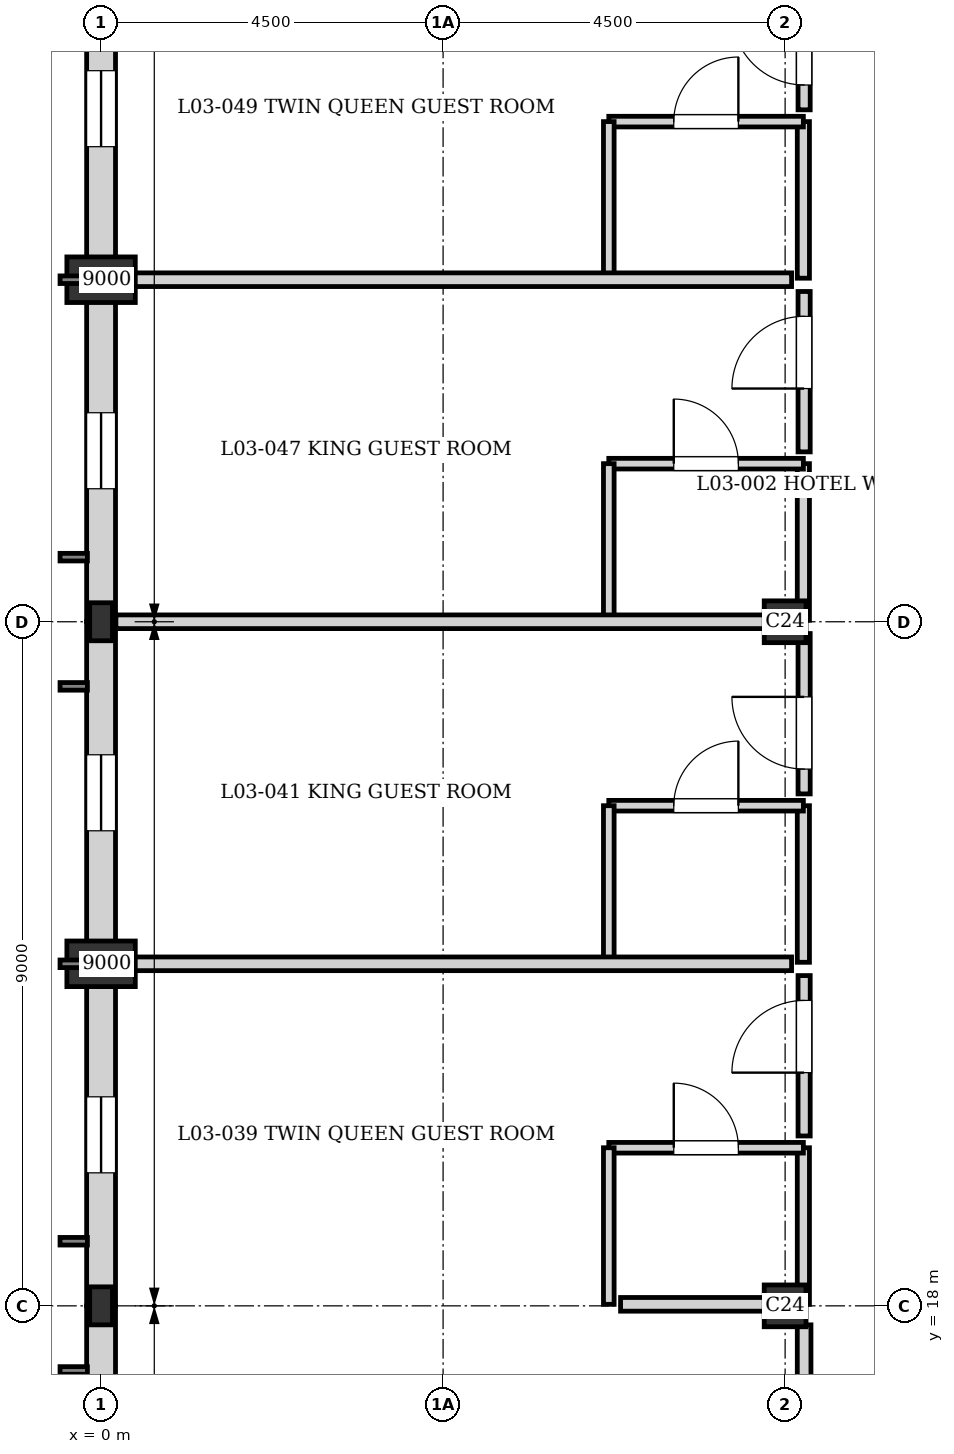
"""IFC4 building model, lengths in metres.
Left out: names, types, materials, properties, quantities, classifications, styles, units other than length and angle.
Written with IfcOpenShell. Run it as: python <this file> out.ifc"""

import sys

from ifc_helpers import new_model, si_unit, direction, frame, frame_2d, origin, origin_2d, place, context, subcontext, project, spatial, rectangle, i_section, extrude, element, fill, save


model = new_model("IFC4")
c1 = context("Model", 3, precision=1e-05, world=origin(), true_north=direction((0.0, 1.0)))
c2 = subcontext(c1, "Body", "Model", "MODEL_VIEW")
j1 = project(units=[si_unit("LENGTHUNIT", "METRE"), si_unit("PLANEANGLEUNIT", "RADIAN")], contexts=[c1])
p1 = place(None, origin())
s1 = spatial("IfcSite", under=j1, at=p1, CompositionType="ELEMENT")
p2 = place(p1, origin())
s2 = spatial("IfcBuilding", under=s1, at=p2, CompositionType="ELEMENT")
p3 = place(p2, frame((0.0, 0.0, 11.52)))
s3 = spatial("IfcBuildingStorey", under=s2, at=p3, CompositionType="ELEMENT", Elevation=11.52)
for number, where, z_axis, x_axis in (
    (1, (0.0, 18.0, 0.0), (0.0, 0.0, 1.0), (1.0, 0.0, 0.0)),
    (2, (0.0, 27.0, 0.0), (0.0, 0.0, 1.0), (1.0, 0.0, 0.0)),
):
    element("IfcColumn", number, at=place(p3, frame(where, z_axis=z_axis, x_axis=x_axis)), inside=s3, PredefinedType="COLUMN", context=c2, shape_type="SweptSolid", body=[
        extrude(i_section(OverallWidth=0.3, OverallDepth=0.5, WebThickness=0.014, FlangeThickness=0.028, at=origin_2d()), origin(), (0.0, 0.0, 1.0), 3.04),
    ])
for number, where, z_axis, x_axis in (
    (3, (9.0, 18.0, 0.0), (0.0, 0.0, 1.0), (1.0, 0.0, 0.0)),
    (4, (9.0, 27.0, 0.0), (0.0, 0.0, 1.0), (1.0, 0.0, 0.0)),
):
    element("IfcColumn", number, at=place(p3, frame(where, z_axis=z_axis, x_axis=x_axis)), inside=s3, PredefinedType="COLUMN", context=c2, shape_type="SweptSolid", body=[
        extrude(rectangle(XDim=0.55, YDim=0.55, at=origin_2d()), origin(), (0.0, 0.0, 1.0), 3.04),
    ])
for number, where, z_axis, x_axis in (
    (5, (0.0, 22.5, 0.0), (0.0, 0.0, 1.0), (0.0, 1.0, 0.0)),
    (6, (0.0, 31.5, 0.0), (0.0, 0.0, 1.0), (0.0, 1.0, 0.0)),
):
    element("IfcColumn", number, at=place(p3, frame(where, z_axis=z_axis, x_axis=x_axis)), inside=s3, PredefinedType="PILASTER", context=c2, shape_type="SweptSolid", body=[
        extrude(rectangle(XDim=0.6, YDim=0.9, at=origin_2d()), origin(), (0.0, 0.0, 1.0), 3.04),
    ])
p4 = place(p3, frame((0.0, 9.0, 0.0), z_axis=(0.0, 0.0, 1.0), x_axis=(0.0, 1.0, 0.0)))
e7 = element("IfcWall", 7, at=p4, inside=s3, PredefinedType="SOLIDWALL", context=c2, shape_type="SweptSolid", body=[
    extrude(rectangle(XDim=9.0, YDim=0.38, at=frame_2d((4.5, 0.0))), origin(), (0.0, 0.0, 1.0), 2.38),
])
p5 = place(p4, frame((1.75, 0.0, 0.35)))
e8 = element("IfcOpeningElement", 8, at=p5, cuts=e7, PredefinedType="OPENING", context=c2, shape_type="SweptSolid", body=[
    extrude(rectangle(XDim=1.0, YDim=1.6, at=frame_2d((0.5, 0.8))), frame((0.0, 0.2, 0.0), z_axis=(0.0, -1.0, 0.0), x_axis=(1.0, 0.0, 0.0)), (0.0, 0.0, 1.0), 0.4),
])
p6 = place(p4, frame((6.25, 0.0, 0.35)))
e9 = element("IfcOpeningElement", 9, at=p6, cuts=e7, PredefinedType="OPENING", context=c2, shape_type="SweptSolid", body=[
    extrude(rectangle(XDim=1.0, YDim=1.6, at=frame_2d((0.5, 0.8))), frame((0.0, 0.2, 0.0), z_axis=(0.0, -1.0, 0.0), x_axis=(1.0, 0.0, 0.0)), (0.0, 0.0, 1.0), 0.4),
])
p7 = place(p3, frame((0.0, 18.0, 0.0), z_axis=(0.0, 0.0, 1.0), x_axis=(0.0, 1.0, 0.0)))
e10 = element("IfcWall", 10, at=p7, inside=s3, PredefinedType="SOLIDWALL", context=c2, shape_type="SweptSolid", body=[
    extrude(rectangle(XDim=9.0, YDim=0.38, at=frame_2d((4.5, 0.0))), origin(), (0.0, 0.0, 1.0), 2.82),
])
p8 = place(p7, frame((1.75, 0.0, 0.35)))
e11 = element("IfcOpeningElement", 11, at=p8, cuts=e10, PredefinedType="OPENING", context=c2, shape_type="SweptSolid", body=[
    extrude(rectangle(XDim=1.0, YDim=1.6, at=frame_2d((0.5, 0.8))), frame((0.0, 0.2, 0.0), z_axis=(0.0, -1.0, 0.0), x_axis=(1.0, 0.0, 0.0)), (0.0, 0.0, 1.0), 0.4),
])
p9 = place(p7, frame((6.25, 0.0, 0.35)))
e12 = element("IfcOpeningElement", 12, at=p9, cuts=e10, PredefinedType="OPENING", context=c2, shape_type="SweptSolid", body=[
    extrude(rectangle(XDim=1.0, YDim=1.6, at=frame_2d((0.5, 0.8))), frame((0.0, 0.2, 0.0), z_axis=(0.0, -1.0, 0.0), x_axis=(1.0, 0.0, 0.0)), (0.0, 0.0, 1.0), 0.4),
])
p10 = place(p3, frame((0.0, 27.0, 0.0), z_axis=(0.0, 0.0, 1.0), x_axis=(0.0, 1.0, 0.0)))
e13 = element("IfcWall", 13, at=p10, inside=s3, PredefinedType="SOLIDWALL", context=c2, shape_type="SweptSolid", body=[
    extrude(rectangle(XDim=8.87, YDim=0.38, at=frame_2d((4.435, 0.0))), origin(), (0.0, 0.0, 1.0), 2.48),
])
p11 = place(p10, frame((1.75, 0.0, 0.35)))
e14 = element("IfcOpeningElement", 14, at=p11, cuts=e13, PredefinedType="OPENING", context=c2, shape_type="SweptSolid", body=[
    extrude(rectangle(XDim=1.0, YDim=1.6, at=frame_2d((0.5, 0.8))), frame((0.0, 0.2, 0.0), z_axis=(0.0, -1.0, 0.0), x_axis=(1.0, 0.0, 0.0)), (0.0, 0.0, 1.0), 0.4),
])
p12 = place(p10, frame((6.25, 0.0, 0.35)))
e15 = element("IfcOpeningElement", 15, at=p12, cuts=e13, PredefinedType="OPENING", context=c2, shape_type="SweptSolid", body=[
    extrude(rectangle(XDim=1.0, YDim=1.6, at=frame_2d((0.5, 0.8))), frame((0.0, 0.2, 0.0), z_axis=(0.0, -1.0, 0.0), x_axis=(1.0, 0.0, 0.0)), (0.0, 0.0, 1.0), 0.4),
])
p13 = place(p3, frame((9.24, 18.02, 0.0), z_axis=(0.0, 0.0, 1.0), x_axis=(0.0, 1.0, 0.0)))
e16 = element("IfcWall", 16, at=p13, inside=s3, PredefinedType="PARTITIONING", context=c2, shape_type="SweptSolid", body=[
    extrude(rectangle(XDim=2.06, YDim=0.16, at=frame_2d((1.03, 0.0))), origin(), (0.0, 0.0, 1.0), 2.82),
])
p14 = place(p3, frame((6.68, 20.08, 0.0), z_axis=(0.0, 0.0, 1.0), x_axis=(1.0, 0.0, 0.0)))
e17 = element("IfcWall", 17, at=p14, inside=s3, PredefinedType="PLUMBINGWALL", context=c2, shape_type="SweptSolid", body=[
    extrude(rectangle(XDim=2.56, YDim=0.14, at=frame_2d((1.28, 0.0))), origin(), (0.0, 0.0, 1.0), 2.82),
])
p15 = place(p14, frame((0.855, 0.0, 0.0)))
e18 = element("IfcOpeningElement", 18, at=p15, cuts=e17, PredefinedType="OPENING", context=c2, shape_type="SweptSolid", body=[
    extrude(rectangle(XDim=0.85, YDim=2.04, at=frame_2d((0.425, 1.02))), frame((0.0, 0.08, 0.0), z_axis=(0.0, -1.0, 0.0), x_axis=(1.0, 0.0, 0.0)), (0.0, 0.0, 1.0), 0.16),
])
p16 = place(p3, frame((6.68, 18.02, 0.0), z_axis=(0.0, 0.0, 1.0), x_axis=(0.0, 1.0, 0.0)))
e19 = element("IfcWall", 19, at=p16, inside=s3, PredefinedType="PLUMBINGWALL", context=c2, shape_type="SweptSolid", body=[
    extrude(rectangle(XDim=2.06, YDim=0.14, at=frame_2d((1.03, 0.0))), origin(), (0.0, 0.0, 1.0), 2.82),
])
p17 = place(p3, frame((9.24, 22.52, 0.0), z_axis=(0.0, 0.0, 1.0), x_axis=(0.0, 1.0, 0.0)))
e20 = element("IfcWall", 20, at=p17, inside=s3, PredefinedType="PARTITIONING", context=c2, shape_type="SweptSolid", body=[
    extrude(rectangle(XDim=2.06, YDim=0.16, at=frame_2d((1.03, 0.0))), origin(), (0.0, 0.0, 1.0), 2.82),
])
p18 = place(p3, frame((6.68, 24.58, 0.0), z_axis=(0.0, 0.0, 1.0), x_axis=(1.0, 0.0, 0.0)))
e21 = element("IfcWall", 21, at=p18, inside=s3, PredefinedType="PLUMBINGWALL", context=c2, shape_type="SweptSolid", body=[
    extrude(rectangle(XDim=2.56, YDim=0.14, at=frame_2d((1.28, 0.0))), origin(), (0.0, 0.0, 1.0), 2.82),
])
p19 = place(p18, frame((0.855, 0.0, 0.0)))
e22 = element("IfcOpeningElement", 22, at=p19, cuts=e21, PredefinedType="OPENING", context=c2, shape_type="SweptSolid", body=[
    extrude(rectangle(XDim=0.85, YDim=2.04, at=frame_2d((0.425, 1.02))), frame((0.0, 0.08, 0.0), z_axis=(0.0, -1.0, 0.0), x_axis=(1.0, 0.0, 0.0)), (0.0, 0.0, 1.0), 0.16),
])
p20 = place(p3, frame((6.68, 22.52, 0.0), z_axis=(0.0, 0.0, 1.0), x_axis=(0.0, 1.0, 0.0)))
e23 = element("IfcWall", 23, at=p20, inside=s3, PredefinedType="PLUMBINGWALL", context=c2, shape_type="SweptSolid", body=[
    extrude(rectangle(XDim=2.06, YDim=0.14, at=frame_2d((1.03, 0.0))), origin(), (0.0, 0.0, 1.0), 2.82),
])
p21 = place(p3, frame((9.24, 27.02, 0.0), z_axis=(0.0, 0.0, 1.0), x_axis=(0.0, 1.0, 0.0)))
e24 = element("IfcWall", 24, at=p21, inside=s3, PredefinedType="PARTITIONING", context=c2, shape_type="SweptSolid", body=[
    extrude(rectangle(XDim=2.06, YDim=0.16, at=frame_2d((1.03, 0.0))), origin(), (0.0, 0.0, 1.0), 2.82),
])
p22 = place(p3, frame((6.68, 29.08, 0.0), z_axis=(0.0, 0.0, 1.0), x_axis=(1.0, 0.0, 0.0)))
e25 = element("IfcWall", 25, at=p22, inside=s3, PredefinedType="PLUMBINGWALL", context=c2, shape_type="SweptSolid", body=[
    extrude(rectangle(XDim=2.56, YDim=0.14, at=frame_2d((1.28, 0.0))), origin(), (0.0, 0.0, 1.0), 2.82),
])
p23 = place(p22, frame((0.855, 0.0, 0.0)))
e26 = element("IfcOpeningElement", 26, at=p23, cuts=e25, PredefinedType="OPENING", context=c2, shape_type="SweptSolid", body=[
    extrude(rectangle(XDim=0.85, YDim=2.04, at=frame_2d((0.425, 1.02))), frame((0.0, 0.08, 0.0), z_axis=(0.0, -1.0, 0.0), x_axis=(1.0, 0.0, 0.0)), (0.0, 0.0, 1.0), 0.16),
])
p24 = place(p3, frame((6.68, 27.02, 0.0), z_axis=(0.0, 0.0, 1.0), x_axis=(0.0, 1.0, 0.0)))
e27 = element("IfcWall", 27, at=p24, inside=s3, PredefinedType="PLUMBINGWALL", context=c2, shape_type="SweptSolid", body=[
    extrude(rectangle(XDim=2.06, YDim=0.14, at=frame_2d((1.03, 0.0))), origin(), (0.0, 0.0, 1.0), 2.82),
])
p25 = place(p3, frame((9.24, 31.52, 0.0), z_axis=(0.0, 0.0, 1.0), x_axis=(0.0, 1.0, 0.0)))
e28 = element("IfcWall", 28, at=p25, inside=s3, PredefinedType="PARTITIONING", context=c2, shape_type="SweptSolid", body=[
    extrude(rectangle(XDim=2.06, YDim=0.16, at=frame_2d((1.03, 0.0))), origin(), (0.0, 0.0, 1.0), 2.82),
])
p26 = place(p3, frame((6.68, 33.58, 0.0), z_axis=(0.0, 0.0, 1.0), x_axis=(1.0, 0.0, 0.0)))
e29 = element("IfcWall", 29, at=p26, inside=s3, PredefinedType="PLUMBINGWALL", context=c2, shape_type="SweptSolid", body=[
    extrude(rectangle(XDim=2.56, YDim=0.14, at=frame_2d((1.28, 0.0))), origin(), (0.0, 0.0, 1.0), 2.82),
])
p27 = place(p26, frame((0.855, 0.0, 0.0)))
e30 = element("IfcOpeningElement", 30, at=p27, cuts=e29, PredefinedType="OPENING", context=c2, shape_type="SweptSolid", body=[
    extrude(rectangle(XDim=0.85, YDim=2.04, at=frame_2d((0.425, 1.02))), frame((0.0, 0.08, 0.0), z_axis=(0.0, -1.0, 0.0), x_axis=(1.0, 0.0, 0.0)), (0.0, 0.0, 1.0), 0.16),
])
p28 = place(p3, frame((6.68, 31.52, 0.0), z_axis=(0.0, 0.0, 1.0), x_axis=(0.0, 1.0, 0.0)))
e31 = element("IfcWall", 31, at=p28, inside=s3, PredefinedType="PLUMBINGWALL", context=c2, shape_type="SweptSolid", body=[
    extrude(rectangle(XDim=2.06, YDim=0.14, at=frame_2d((1.03, 0.0))), origin(), (0.0, 0.0, 1.0), 2.82),
])
p29 = place(p3, frame((9.25, 11.45, 0.0), z_axis=(0.0, 0.0, 1.0), x_axis=(0.0, 1.0, 0.0)))
e32 = element("IfcWall", 32, at=p29, inside=s3, PredefinedType="PARTITIONING", context=c2, shape_type="SweptSolid", body=[
    extrude(rectangle(XDim=6.3, YDim=0.18, at=frame_2d((3.15, 0.0))), origin(), (0.0, 0.0, 1.0), 2.82),
])
p30 = place(p3, frame((0.195, 22.5, 0.0), z_axis=(0.0, 0.0, 1.0), x_axis=(1.0, 0.0, 0.0)))
e33 = element("IfcWall", 33, at=p30, inside=s3, PredefinedType="PARTITIONING", context=c2, shape_type="SweptSolid", body=[
    extrude(rectangle(XDim=8.89, YDim=0.18, at=frame_2d((4.445, 0.0))), origin(), (0.0, 0.0, 1.0), 2.82),
])
p31 = place(p3, frame((0.195, 27.0, 0.0), z_axis=(0.0, 0.0, 1.0), x_axis=(1.0, 0.0, 0.0)))
e34 = element("IfcWall", 34, at=p31, inside=s3, PredefinedType="PARTITIONING", context=c2, shape_type="SweptSolid", body=[
    extrude(rectangle(XDim=8.89, YDim=0.18, at=frame_2d((4.445, 0.0))), origin(), (0.0, 0.0, 1.0), 2.45),
])
p32 = place(p3, frame((0.195, 31.5, 0.0), z_axis=(0.0, 0.0, 1.0), x_axis=(1.0, 0.0, 0.0)))
e35 = element("IfcWall", 35, at=p32, inside=s3, PredefinedType="PARTITIONING", context=c2, shape_type="SweptSolid", body=[
    extrude(rectangle(XDim=8.89, YDim=0.18, at=frame_2d((4.445, 0.0))), origin(), (0.0, 0.0, 1.0), 2.82),
])
p33 = place(p3, frame((6.835, 18.02, 0.0), z_axis=(0.0, 0.0, 1.0), x_axis=(1.0, 0.0, 0.0)))
e36 = element("IfcWall", 36, at=p33, inside=s3, PredefinedType="PARTITIONING", context=c2, shape_type="SweptSolid", body=[
    extrude(rectangle(XDim=2.26, YDim=0.18, at=frame_2d((1.13, 0.0))), origin(), (0.0, 0.0, 1.0), 2.48),
])
p34 = place(p3, frame((9.25, 20.235, 0.0), z_axis=(0.0, 0.0, 1.0), x_axis=(0.0, 1.0, 0.0)))
e37 = element("IfcWall", 37, at=p34, inside=s3, PredefinedType="PARTITIONING", context=c2, shape_type="SweptSolid", body=[
    extrude(rectangle(XDim=2.11, YDim=0.16, at=frame_2d((1.055, 0.0))), origin(), (0.0, 0.0, 1.0), 2.82),
])
p35 = place(p34, frame((0.833, 0.0, 0.0)))
e38 = element("IfcOpeningElement", 38, at=p35, cuts=e37, PredefinedType="OPENING", context=c2, shape_type="SweptSolid", body=[
    extrude(rectangle(XDim=0.95, YDim=2.15, at=frame_2d((0.475, 1.075))), frame((0.0, 0.09, 0.0), z_axis=(0.0, -1.0, 0.0), x_axis=(1.0, 0.0, 0.0)), (0.0, 0.0, 1.0), 0.18),
])
p36 = place(p3, frame((9.25, 24.735, 0.0), z_axis=(0.0, 0.0, 1.0), x_axis=(0.0, 1.0, 0.0)))
e39 = element("IfcWall", 39, at=p36, inside=s3, PredefinedType="PARTITIONING", context=c2, shape_type="SweptSolid", body=[
    extrude(rectangle(XDim=2.11, YDim=0.16, at=frame_2d((1.055, 0.0))), origin(), (0.0, 0.0, 1.0), 2.82),
])
p37 = place(p36, frame((0.327, 0.0, 0.0)))
e40 = element("IfcOpeningElement", 40, at=p37, cuts=e39, PredefinedType="OPENING", context=c2, shape_type="SweptSolid", body=[
    extrude(rectangle(XDim=0.95, YDim=2.15, at=frame_2d((0.475, 1.075))), frame((0.0, 0.09, 0.0), z_axis=(0.0, -1.0, 0.0), x_axis=(1.0, 0.0, 0.0)), (0.0, 0.0, 1.0), 0.18),
])
p38 = place(p3, frame((9.25, 29.235, 0.0), z_axis=(0.0, 0.0, 1.0), x_axis=(0.0, 1.0, 0.0)))
e41 = element("IfcWall", 41, at=p38, inside=s3, PredefinedType="PARTITIONING", context=c2, shape_type="SweptSolid", body=[
    extrude(rectangle(XDim=2.11, YDim=0.16, at=frame_2d((1.055, 0.0))), origin(), (0.0, 0.0, 1.0), 2.82),
])
p39 = place(p38, frame((0.833, 0.0, 0.0)))
e42 = element("IfcOpeningElement", 42, at=p39, cuts=e41, PredefinedType="OPENING", context=c2, shape_type="SweptSolid", body=[
    extrude(rectangle(XDim=0.95, YDim=2.15, at=frame_2d((0.475, 1.075))), frame((0.0, 0.09, 0.0), z_axis=(0.0, -1.0, 0.0), x_axis=(1.0, 0.0, 0.0)), (0.0, 0.0, 1.0), 0.18),
])
p40 = place(p3, frame((9.25, 33.735, 0.0), z_axis=(0.0, 0.0, 1.0), x_axis=(0.0, 1.0, 0.0)))
e43 = element("IfcWall", 43, at=p40, inside=s3, PredefinedType="PARTITIONING", context=c2, shape_type="SweptSolid", body=[
    extrude(rectangle(XDim=2.11, YDim=0.16, at=frame_2d((1.055, 0.0))), origin(), (0.0, 0.0, 1.0), 2.82),
])
p41 = place(p40, frame((0.327, 0.0, 0.0)))
e44 = element("IfcOpeningElement", 44, at=p41, cuts=e43, PredefinedType="OPENING", context=c2, shape_type="SweptSolid", body=[
    extrude(rectangle(XDim=0.95, YDim=2.15, at=frame_2d((0.475, 1.075))), frame((0.0, 0.09, 0.0), z_axis=(0.0, -1.0, 0.0), x_axis=(1.0, 0.0, 0.0)), (0.0, 0.0, 1.0), 0.18),
])
p42 = place(p8, origin())
e45 = element("IfcWindow", 45, at=p42, inside=s3, PartitioningType="SINGLE_PANEL", PredefinedType="WINDOW", context=c2, shape_type="SweptSolid", body=[
    extrude(rectangle(XDim=1.0, YDim=1.6, at=frame_2d((0.5, 0.8))), frame((0.0, 0.03, 0.0), z_axis=(0.0, -1.0, 0.0), x_axis=(1.0, 0.0, 0.0)), (0.0, 0.0, 1.0), 0.06),
])
fill(e11, e45)
p43 = place(p9, origin())
e46 = element("IfcWindow", 46, at=p43, inside=s3, PartitioningType="SINGLE_PANEL", PredefinedType="WINDOW", context=c2, shape_type="SweptSolid", body=[
    extrude(rectangle(XDim=1.0, YDim=1.6, at=frame_2d((0.5, 0.8))), frame((0.0, 0.03, 0.0), z_axis=(0.0, -1.0, 0.0), x_axis=(1.0, 0.0, 0.0)), (0.0, 0.0, 1.0), 0.06),
])
fill(e12, e46)
p44 = place(p11, origin())
e47 = element("IfcWindow", 47, at=p44, inside=s3, PartitioningType="SINGLE_PANEL", PredefinedType="WINDOW", context=c2, shape_type="SweptSolid", body=[
    extrude(rectangle(XDim=1.0, YDim=1.6, at=frame_2d((0.5, 0.8))), frame((0.0, 0.03, 0.0), z_axis=(0.0, -1.0, 0.0), x_axis=(1.0, 0.0, 0.0)), (0.0, 0.0, 1.0), 0.06),
])
fill(e14, e47)
p45 = place(p12, origin())
e48 = element("IfcWindow", 48, at=p45, inside=s3, PartitioningType="SINGLE_PANEL", PredefinedType="WINDOW", context=c2, shape_type="SweptSolid", body=[
    extrude(rectangle(XDim=1.0, YDim=1.6, at=frame_2d((0.5, 0.8))), frame((0.0, 0.03, 0.0), z_axis=(0.0, -1.0, 0.0), x_axis=(1.0, 0.0, 0.0)), (0.0, 0.0, 1.0), 0.06),
])
fill(e15, e48)
p46 = place(p15, origin())
e49 = element("IfcDoor", 49, at=p46, inside=s3, OperationType="SINGLE_SWING_LEFT", PredefinedType="DOOR", context=c2, shape_type="SweptSolid", body=[
    extrude(rectangle(XDim=0.85, YDim=2.04, at=frame_2d((0.425, 1.02))), frame((0.0, 0.025, 0.0), z_axis=(0.0, -1.0, 0.0), x_axis=(1.0, 0.0, 0.0)), (0.0, 0.0, 1.0), 0.05),
])
fill(e18, e49)
p47 = place(p19, origin())
e50 = element("IfcDoor", 50, at=p47, inside=s3, OperationType="SINGLE_SWING_RIGHT", PredefinedType="DOOR", context=c2, shape_type="SweptSolid", body=[
    extrude(rectangle(XDim=0.85, YDim=2.04, at=frame_2d((0.425, 1.02))), frame((0.0, 0.025, 0.0), z_axis=(0.0, -1.0, 0.0), x_axis=(1.0, 0.0, 0.0)), (0.0, 0.0, 1.0), 0.05),
])
fill(e22, e50)
p48 = place(p23, origin())
e51 = element("IfcDoor", 51, at=p48, inside=s3, OperationType="SINGLE_SWING_LEFT", PredefinedType="DOOR", context=c2, shape_type="SweptSolid", body=[
    extrude(rectangle(XDim=0.85, YDim=2.04, at=frame_2d((0.425, 1.02))), frame((0.0, 0.025, 0.0), z_axis=(0.0, -1.0, 0.0), x_axis=(1.0, 0.0, 0.0)), (0.0, 0.0, 1.0), 0.05),
])
fill(e26, e51)
p49 = place(p27, origin())
e52 = element("IfcDoor", 52, at=p49, inside=s3, OperationType="SINGLE_SWING_RIGHT", PredefinedType="DOOR", context=c2, shape_type="SweptSolid", body=[
    extrude(rectangle(XDim=0.85, YDim=2.04, at=frame_2d((0.425, 1.02))), frame((0.0, 0.025, 0.0), z_axis=(0.0, -1.0, 0.0), x_axis=(1.0, 0.0, 0.0)), (0.0, 0.0, 1.0), 0.05),
])
fill(e30, e52)
p50 = place(p35, origin())
e53 = element("IfcDoor", 53, at=p50, inside=s3, OperationType="SINGLE_SWING_LEFT", PredefinedType="DOOR", context=c2, shape_type="SweptSolid", body=[
    extrude(rectangle(XDim=0.95, YDim=2.15, at=frame_2d((0.475, 1.075))), frame((0.0, 0.025, 0.0), z_axis=(0.0, -1.0, 0.0), x_axis=(1.0, 0.0, 0.0)), (0.0, 0.0, 1.0), 0.05),
])
fill(e38, e53)
p51 = place(p37, origin())
e54 = element("IfcDoor", 54, at=p51, inside=s3, OperationType="SINGLE_SWING_RIGHT", PredefinedType="DOOR", context=c2, shape_type="SweptSolid", body=[
    extrude(rectangle(XDim=0.95, YDim=2.15, at=frame_2d((0.475, 1.075))), frame((0.0, 0.025, 0.0), z_axis=(0.0, -1.0, 0.0), x_axis=(1.0, 0.0, 0.0)), (0.0, 0.0, 1.0), 0.05),
])
fill(e40, e54)
p52 = place(p39, origin())
e55 = element("IfcDoor", 55, at=p52, inside=s3, OperationType="SINGLE_SWING_LEFT", PredefinedType="DOOR", context=c2, shape_type="SweptSolid", body=[
    extrude(rectangle(XDim=0.95, YDim=2.15, at=frame_2d((0.475, 1.075))), frame((0.0, 0.025, 0.0), z_axis=(0.0, -1.0, 0.0), x_axis=(1.0, 0.0, 0.0)), (0.0, 0.0, 1.0), 0.05),
])
fill(e42, e55)
p53 = place(p41, origin())
e56 = element("IfcDoor", 56, at=p53, inside=s3, OperationType="SINGLE_SWING_RIGHT", PredefinedType="DOOR", context=c2, shape_type="SweptSolid", body=[
    extrude(rectangle(XDim=0.95, YDim=2.15, at=frame_2d((0.475, 1.075))), frame((0.0, 0.025, 0.0), z_axis=(0.0, -1.0, 0.0), x_axis=(1.0, 0.0, 0.0)), (0.0, 0.0, 1.0), 0.05),
])
fill(e44, e56)
save(model, sys.argv[1])
